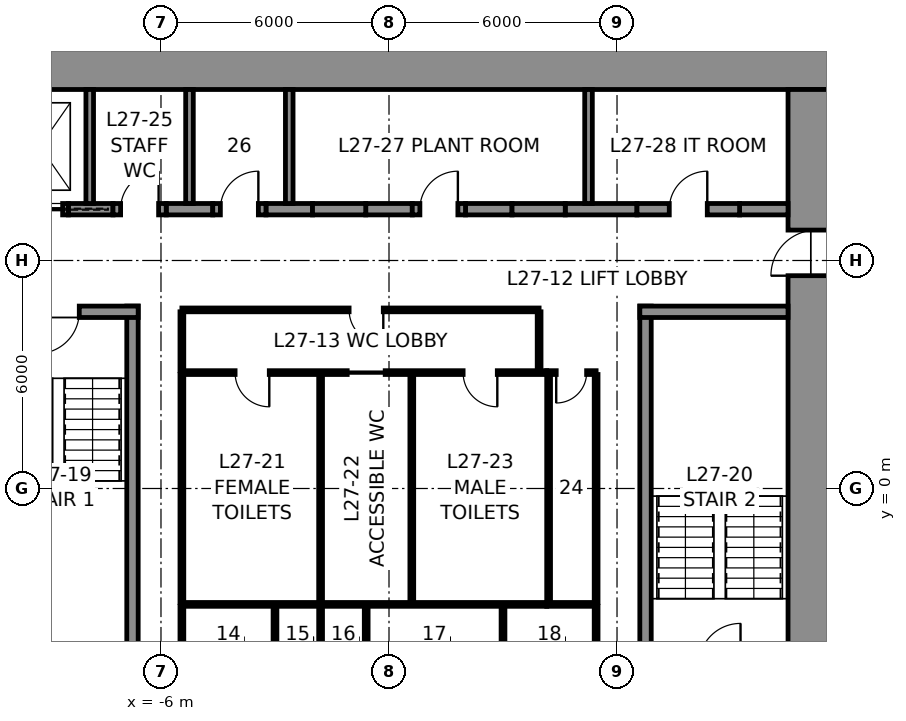
"""IFC4 building model, lengths in metres.
Left out: names, types, materials, properties, quantities, classifications, styles, units other than length and angle.
Written with IfcOpenShell. Run it as: python <this file> out.ifc"""

import sys

from ifc_helpers import new_model, si_unit, direction, frame, frame_2d, origin, place, context, subcontext, project, spatial, rectangle, extrude, element, fill, save


model = new_model("IFC4")
c1 = context("Model", 3, precision=1e-05, world=origin(), true_north=direction((0.0, 1.0)))
c2 = subcontext(c1, "Body", "Model", "MODEL_VIEW")
j1 = project(units=[si_unit("LENGTHUNIT", "METRE"), si_unit("PLANEANGLEUNIT", "RADIAN")], contexts=[c1])
p1 = place(None, origin())
s1 = spatial("IfcSite", under=j1, at=p1, CompositionType="ELEMENT")
p2 = place(p1, origin())
s2 = spatial("IfcBuilding", under=s1, at=p2, CompositionType="ELEMENT")
p3 = place(p2, frame((0.0, 0.0, 135.8)))
s3 = spatial("IfcBuildingStorey", under=s2, at=p3, CompositionType="ELEMENT", Elevation=135.8)
p4 = place(p3, frame((-12.0, 11.25, 0.0), z_axis=(0.0, 0.0, 1.0), x_axis=(1.0, 0.0, 0.0)))
e1 = element("IfcWall", 1, at=p4, inside=s3, PredefinedType="SHEAR", context=c2, shape_type="SweptSolid", body=[
    extrude(rectangle(XDim=24.0, YDim=1.5, at=frame_2d((12.0, 0.0))), origin(), (0.0, 0.0, 1.0), 4.0),
])
p5 = place(p3, frame((11.25, 10.5, 0.0), z_axis=(0.0, 0.0, 1.0), x_axis=(0.0, -1.0, 0.0)))
e2 = element("IfcWall", 2, at=p5, inside=s3, PredefinedType="SHEAR", context=c2, shape_type="SweptSolid", body=[
    extrude(rectangle(XDim=21.0, YDim=1.5, at=frame_2d((10.5, 0.0))), origin(), (0.0, 0.0, 1.0), 4.0),
])
p6 = place(p5, frame((3.7, 0.0, 0.0)))
e3 = element("IfcOpeningElement", 3, at=p6, cuts=e2, PredefinedType="OPENING", context=c2, shape_type="SweptSolid", body=[
    extrude(rectangle(XDim=1.2, YDim=2.3, at=frame_2d((0.6, 1.15))), frame((0.0, 0.76, 0.0), z_axis=(0.0, -1.0, 0.0), x_axis=(1.0, 0.0, 0.0)), (0.0, 0.0, 1.0), 1.52),
])
p7 = place(p5, frame((16.1, 0.0, 0.0)))
e4 = element("IfcOpeningElement", 4, at=p7, cuts=e2, PredefinedType="OPENING", context=c2, shape_type="SweptSolid", body=[
    extrude(rectangle(XDim=1.2, YDim=2.3, at=frame_2d((0.6, 1.15))), frame((0.0, 0.76, 0.0), z_axis=(0.0, -1.0, 0.0), x_axis=(1.0, 0.0, 0.0)), (0.0, 0.0, 1.0), 1.52),
])
p8 = place(p3, frame((-8.438, 7.35, 0.0), z_axis=(0.0, 0.0, 1.0), x_axis=(1.0, 0.0, 0.0)))
e5 = element("IfcWall", 5, at=p8, inside=s3, PredefinedType="SHEAR", context=c2, shape_type="SweptSolid", body=[
    extrude(rectangle(XDim=1.175, YDim=0.3, at=frame_2d((0.587, 0.0))), origin(), (0.0, 0.0, 1.0), 4.0),
])
for number, where, z_axis, x_axis in (
    (6, (-5.863, 7.35, 0.0), (0.0, 0.0, 1.0), (1.0, 0.0, 0.0)),
    (7, (-3.238, 7.35, 0.0), (0.0, 0.0, 1.0), (1.0, 0.0, 0.0)),
    (8, (-0.613, 7.35, 0.0), (0.0, 0.0, 1.0), (1.0, 0.0, 0.0)),
    (9, (2.012, 7.35, 0.0), (0.0, 0.0, 1.0), (1.0, 0.0, 0.0)),
):
    element("IfcWall", number, at=place(p3, frame(where, z_axis=z_axis, x_axis=x_axis)), inside=s3, PredefinedType="SHEAR", context=c2, shape_type="SweptSolid", body=[
        extrude(rectangle(XDim=1.225, YDim=0.3, at=frame_2d((0.613, 0.0))), origin(), (0.0, 0.0, 1.0), 4.0),
    ])
p9 = place(p3, frame((4.637, 7.35, 0.0), z_axis=(0.0, 0.0, 1.0), x_axis=(1.0, 0.0, 0.0)))
e10 = element("IfcWall", 10, at=p9, inside=s3, PredefinedType="SHEAR", context=c2, shape_type="SweptSolid", body=[
    extrude(rectangle(XDim=1.887, YDim=0.3, at=frame_2d((0.944, 0.0))), origin(), (0.0, 0.0, 1.0), 4.0),
])
p10 = place(p3, frame((9.225, 7.35, 0.0), z_axis=(0.0, 0.0, 1.0), x_axis=(1.0, 0.0, 0.0)))
e11 = element("IfcWall", 11, at=p10, inside=s3, PredefinedType="SHEAR", context=c2, shape_type="SweptSolid", body=[
    extrude(rectangle(XDim=1.275, YDim=0.3, at=frame_2d((0.637, 0.0))), origin(), (0.0, 0.0, 1.0), 4.0),
])
p11 = place(p3, frame((-9.938, 7.35, 0.0), z_axis=(0.0, 0.0, 1.0), x_axis=(1.0, 0.0, 0.0)))
e12 = element("IfcWall", 12, at=p11, inside=s3, PredefinedType="PARTITIONING", context=c2, shape_type="SweptSolid", body=[
    extrude(rectangle(XDim=1.5, YDim=0.3, at=frame_2d((0.75, 0.0))), origin(), (0.0, 0.0, 1.0), 4.0),
])
p12 = place(p11, frame((0.15, 0.0, 0.0)))
e13 = element("IfcOpeningElement", 13, at=p12, cuts=e12, PredefinedType="OPENING", context=c2, shape_type="SweptSolid", body=[
    extrude(rectangle(XDim=1.2, YDim=2.3, at=frame_2d((0.6, 1.15))), frame((0.0, 0.16, 0.0), z_axis=(0.0, -1.0, 0.0), x_axis=(1.0, 0.0, 0.0)), (0.0, 0.0, 1.0), 0.32),
])
p13 = place(p3, frame((-7.262, 7.35, 0.0), z_axis=(0.0, 0.0, 1.0), x_axis=(1.0, 0.0, 0.0)))
e14 = element("IfcWall", 14, at=p13, inside=s3, PredefinedType="PARTITIONING", context=c2, shape_type="SweptSolid", body=[
    extrude(rectangle(XDim=1.4, YDim=0.3, at=frame_2d((0.7, 0.0))), origin(), (0.0, 0.0, 1.0), 4.0),
])
p14 = place(p13, frame((0.2, 0.0, 0.0)))
e15 = element("IfcOpeningElement", 15, at=p14, cuts=e14, PredefinedType="OPENING", context=c2, shape_type="SweptSolid", body=[
    extrude(rectangle(XDim=1.0, YDim=2.3, at=frame_2d((0.5, 1.15))), frame((0.0, 0.16, 0.0), z_axis=(0.0, -1.0, 0.0), x_axis=(1.0, 0.0, 0.0)), (0.0, 0.0, 1.0), 0.32),
])
p15 = place(p3, frame((-4.637, 7.35, 0.0), z_axis=(0.0, 0.0, 1.0), x_axis=(1.0, 0.0, 0.0)))
e16 = element("IfcWall", 16, at=p15, inside=s3, PredefinedType="PARTITIONING", context=c2, shape_type="SweptSolid", body=[
    extrude(rectangle(XDim=1.4, YDim=0.3, at=frame_2d((0.7, 0.0))), origin(), (0.0, 0.0, 1.0), 4.0),
])
p16 = place(p15, frame((0.2, 0.0, 0.0)))
e17 = element("IfcOpeningElement", 17, at=p16, cuts=e16, PredefinedType="OPENING", context=c2, shape_type="SweptSolid", body=[
    extrude(rectangle(XDim=1.0, YDim=2.3, at=frame_2d((0.5, 1.15))), frame((0.0, 0.16, 0.0), z_axis=(0.0, -1.0, 0.0), x_axis=(1.0, 0.0, 0.0)), (0.0, 0.0, 1.0), 0.32),
])
p17 = place(p3, frame((-2.012, 7.35, 0.0), z_axis=(0.0, 0.0, 1.0), x_axis=(1.0, 0.0, 0.0)))
e18 = element("IfcWall", 18, at=p17, inside=s3, PredefinedType="PARTITIONING", context=c2, shape_type="SweptSolid", body=[
    extrude(rectangle(XDim=1.4, YDim=0.3, at=frame_2d((0.7, 0.0))), origin(), (0.0, 0.0, 1.0), 4.0),
])
p18 = place(p3, frame((0.613, 7.35, 0.0), z_axis=(0.0, 0.0, 1.0), x_axis=(1.0, 0.0, 0.0)))
e19 = element("IfcWall", 19, at=p18, inside=s3, PredefinedType="PARTITIONING", context=c2, shape_type="SweptSolid", body=[
    extrude(rectangle(XDim=1.4, YDim=0.3, at=frame_2d((0.7, 0.0))), origin(), (0.0, 0.0, 1.0), 4.0),
])
p19 = place(p18, frame((0.2, 0.0, 0.0)))
e20 = element("IfcOpeningElement", 20, at=p19, cuts=e19, PredefinedType="OPENING", context=c2, shape_type="SweptSolid", body=[
    extrude(rectangle(XDim=1.0, YDim=2.3, at=frame_2d((0.5, 1.15))), frame((0.0, 0.16, 0.0), z_axis=(0.0, -1.0, 0.0), x_axis=(1.0, 0.0, 0.0)), (0.0, 0.0, 1.0), 0.32),
])
p20 = place(p3, frame((3.238, 7.35, 0.0), z_axis=(0.0, 0.0, 1.0), x_axis=(1.0, 0.0, 0.0)))
e21 = element("IfcWall", 21, at=p20, inside=s3, PredefinedType="PARTITIONING", context=c2, shape_type="SweptSolid", body=[
    extrude(rectangle(XDim=1.4, YDim=0.3, at=frame_2d((0.7, 0.0))), origin(), (0.0, 0.0, 1.0), 4.0),
])
p21 = place(p3, frame((6.525, 7.35, 0.0), z_axis=(0.0, 0.0, 1.0), x_axis=(1.0, 0.0, 0.0)))
e22 = element("IfcWall", 22, at=p21, inside=s3, PredefinedType="PARTITIONING", context=c2, shape_type="SweptSolid", body=[
    extrude(rectangle(XDim=2.7, YDim=0.3, at=frame_2d((1.35, 0.0))), origin(), (0.0, 0.0, 1.0), 4.0),
])
p22 = place(p21, frame((0.85, 0.0, 0.0)))
e23 = element("IfcOpeningElement", 23, at=p22, cuts=e22, PredefinedType="OPENING", context=c2, shape_type="SweptSolid", body=[
    extrude(rectangle(XDim=1.0, YDim=2.3, at=frame_2d((0.5, 1.15))), frame((0.0, 0.16, 0.0), z_axis=(0.0, -1.0, 0.0), x_axis=(1.0, 0.0, 0.0)), (0.0, 0.0, 1.0), 0.32),
])
for number, where, z_axis, x_axis in (
    (24, (-7.875, 7.5, 0.0), (0.0, 0.0, 1.0), (0.0, 1.0, 0.0)),
    (25, (-5.25, 7.5, 0.0), (0.0, 0.0, 1.0), (0.0, 1.0, 0.0)),
    (26, (-2.625, 7.5, 0.0), (0.0, 0.0, 1.0), (0.0, 1.0, 0.0)),
    (27, (5.25, 7.5, 0.0), (0.0, 0.0, 1.0), (0.0, 1.0, 0.0)),
):
    element("IfcWall", number, at=place(p3, frame(where, z_axis=z_axis, x_axis=x_axis)), inside=s3, PredefinedType="PARTITIONING", context=c2, shape_type="SweptSolid", body=[
        extrude(rectangle(XDim=3.0, YDim=0.2, at=frame_2d((1.5, 0.0))), origin(), (0.0, 0.0, 1.0), 4.0),
    ])
p23 = place(p3, frame((-6.75, -4.8, 0.0), z_axis=(0.0, 0.0, 1.0), x_axis=(0.0, 1.0, 0.0)))
e28 = element("IfcWall", 28, at=p23, inside=s3, PredefinedType="SOLIDWALL", context=c2, shape_type="SweptSolid", body=[
    extrude(rectangle(XDim=9.6, YDim=0.3, at=frame_2d((4.8, 0.0))), origin(), (0.0, 0.0, 1.0), 3.75),
])
p24 = place(p3, frame((-10.5, 4.65, 0.0), z_axis=(0.0, 0.0, 1.0), x_axis=(1.0, 0.0, 0.0)))
e29 = element("IfcWall", 29, at=p24, inside=s3, PredefinedType="SOLIDWALL", context=c2, shape_type="SweptSolid", body=[
    extrude(rectangle(XDim=3.9, YDim=0.3, at=frame_2d((1.95, 0.0))), origin(), (0.0, 0.0, 1.0), 3.75),
])
p25 = place(p24, frame((1.25, 0.0, 0.0)))
e30 = element("IfcOpeningElement", 30, at=p25, cuts=e29, PredefinedType="OPENING", context=c2, shape_type="SweptSolid", body=[
    extrude(rectangle(XDim=1.1, YDim=2.3, at=frame_2d((0.55, 1.15))), frame((0.0, 0.16, 0.0), z_axis=(0.0, -1.0, 0.0), x_axis=(1.0, 0.0, 0.0)), (0.0, 0.0, 1.0), 0.32),
])
p26 = place(p3, frame((6.75, -4.8, 0.0), z_axis=(0.0, 0.0, 1.0), x_axis=(0.0, 1.0, 0.0)))
e31 = element("IfcWall", 31, at=p26, inside=s3, PredefinedType="SOLIDWALL", context=c2, shape_type="SweptSolid", body=[
    extrude(rectangle(XDim=9.6, YDim=0.3, at=frame_2d((4.8, 0.0))), origin(), (0.0, 0.0, 1.0), 3.75),
])
p27 = place(p3, frame((6.6, 4.65, 0.0), z_axis=(0.0, 0.0, 1.0), x_axis=(1.0, 0.0, 0.0)))
e32 = element("IfcWall", 32, at=p27, inside=s3, PredefinedType="SOLIDWALL", context=c2, shape_type="SweptSolid", body=[
    extrude(rectangle(XDim=3.9, YDim=0.3, at=frame_2d((1.95, 0.0))), origin(), (0.0, 0.0, 1.0), 3.75),
])
p28 = place(p3, frame((-5.45, 3.05, 0.0), z_axis=(0.0, 0.0, 1.0), x_axis=(1.0, 0.0, 0.0)))
e33 = element("IfcWall", 33, at=p28, inside=s3, PredefinedType="PARTITIONING", context=c2, shape_type="SweptSolid", body=[
    extrude(rectangle(XDim=9.6, YDim=0.1, at=frame_2d((4.8, 0.0))), origin(), (0.0, 0.0, 1.0), 3.75),
])
p29 = place(p28, frame((1.4, 0.0, 0.0)))
e34 = element("IfcOpeningElement", 34, at=p29, cuts=e33, PredefinedType="OPENING", context=c2, shape_type="SweptSolid", body=[
    extrude(rectangle(XDim=0.9, YDim=2.3, at=frame_2d((0.45, 1.15))), frame((0.0, 0.06, 0.0), z_axis=(0.0, -1.0, 0.0), x_axis=(1.0, 0.0, 0.0)), (0.0, 0.0, 1.0), 0.12),
])
p30 = place(p28, frame((4.35, 0.0, 0.0)))
e35 = element("IfcOpeningElement", 35, at=p30, cuts=e33, PredefinedType="OPENING", context=c2, shape_type="SweptSolid", body=[
    extrude(rectangle(XDim=1.0, YDim=2.3, at=frame_2d((0.5, 1.15))), frame((0.0, 0.06, 0.0), z_axis=(0.0, -1.0, 0.0), x_axis=(1.0, 0.0, 0.0)), (0.0, 0.0, 1.0), 0.12),
])
p31 = place(p28, frame((7.4, 0.0, 0.0)))
e36 = element("IfcOpeningElement", 36, at=p31, cuts=e33, PredefinedType="OPENING", context=c2, shape_type="SweptSolid", body=[
    extrude(rectangle(XDim=0.9, YDim=2.3, at=frame_2d((0.45, 1.15))), frame((0.0, 0.06, 0.0), z_axis=(0.0, -1.0, 0.0), x_axis=(1.0, 0.0, 0.0)), (0.0, 0.0, 1.0), 0.12),
])
p32 = place(p3, frame((4.15, 3.05, 0.0), z_axis=(0.0, 0.0, 1.0), x_axis=(1.0, 0.0, 0.0)))
e37 = element("IfcWall", 37, at=p32, inside=s3, PredefinedType="PARTITIONING", context=c2, shape_type="SweptSolid", body=[
    extrude(rectangle(XDim=1.3, YDim=0.1, at=frame_2d((0.65, 0.0))), origin(), (0.0, 0.0, 1.0), 3.75),
])
p33 = place(p32, frame((0.25, 0.0, 0.0)))
e38 = element("IfcOpeningElement", 38, at=p33, cuts=e37, PredefinedType="OPENING", context=c2, shape_type="SweptSolid", body=[
    extrude(rectangle(XDim=0.8, YDim=2.3, at=frame_2d((0.4, 1.15))), frame((0.0, 0.06, 0.0), z_axis=(0.0, -1.0, 0.0), x_axis=(1.0, 0.0, 0.0)), (0.0, 0.0, 1.0), 0.12),
])
p34 = place(p3, frame((4.15, -3.05, 0.0), z_axis=(0.0, 0.0, 1.0), x_axis=(-1.0, 0.0, 0.0)))
e39 = element("IfcWall", 39, at=p34, inside=s3, PredefinedType="PARTITIONING", context=c2, shape_type="SweptSolid", body=[
    extrude(rectangle(XDim=9.6, YDim=0.1, at=frame_2d((4.8, 0.0))), origin(), (0.0, 0.0, 1.0), 3.75),
])
p35 = place(p3, frame((5.45, -3.05, 0.0), z_axis=(0.0, 0.0, 1.0), x_axis=(-1.0, 0.0, 0.0)))
e40 = element("IfcWall", 40, at=p35, inside=s3, PredefinedType="PARTITIONING", context=c2, shape_type="SweptSolid", body=[
    extrude(rectangle(XDim=1.3, YDim=0.1, at=frame_2d((0.65, 0.0))), origin(), (0.0, 0.0, 1.0), 3.75),
])
for number, where, z_axis, x_axis in (
    (41, (5.45, 3.0, 0.0), (0.0, 0.0, 1.0), (0.0, -1.0, 0.0)),
    (42, (-5.45, -3.0, 0.0), (0.0, 0.0, 1.0), (0.0, 1.0, 0.0)),
    (43, (-1.8, -3.0, 0.0), (0.0, 0.0, 1.0), (0.0, 1.0, 0.0)),
    (44, (0.6, -3.0, 0.0), (0.0, 0.0, 1.0), (0.0, 1.0, 0.0)),
    (45, (4.2, -3.0, 0.0), (0.0, 0.0, 1.0), (0.0, 1.0, 0.0)),
):
    element("IfcWall", number, at=place(p3, frame(where, z_axis=z_axis, x_axis=x_axis)), inside=s3, PredefinedType="PARTITIONING", context=c2, shape_type="SweptSolid", body=[
        extrude(rectangle(XDim=6.0, YDim=0.1, at=frame_2d((3.0, 0.0))), origin(), (0.0, 0.0, 1.0), 3.75),
    ])
p36 = place(p3, frame((-5.45, 4.7, 0.0), z_axis=(0.0, 0.0, 1.0), x_axis=(1.0, 0.0, 0.0)))
e46 = element("IfcWall", 46, at=p36, inside=s3, PredefinedType="PARTITIONING", context=c2, shape_type="SweptSolid", body=[
    extrude(rectangle(XDim=9.4, YDim=0.1, at=frame_2d((4.7, 0.0))), origin(), (0.0, 0.0, 1.0), 3.75),
])
p37 = place(p36, frame((4.4, 0.0, 0.0)))
e47 = element("IfcOpeningElement", 47, at=p37, cuts=e46, PredefinedType="OPENING", context=c2, shape_type="SweptSolid", body=[
    extrude(rectangle(XDim=0.9, YDim=2.3, at=frame_2d((0.45, 1.15))), frame((0.0, 0.06, 0.0), z_axis=(0.0, -1.0, 0.0), x_axis=(1.0, 0.0, 0.0)), (0.0, 0.0, 1.0), 0.12),
])
for number, where, z_axis, x_axis in (
    (48, (-5.45, 3.1, 0.0), (0.0, 0.0, 1.0), (0.0, 1.0, 0.0)),
    (49, (3.95, 3.1, 0.0), (0.0, 0.0, 1.0), (0.0, 1.0, 0.0)),
    (50, (-5.45, -3.1, 0.0), (0.0, 0.0, 1.0), (0.0, -1.0, 0.0)),
    (51, (5.45, -3.1, 0.0), (0.0, 0.0, 1.0), (0.0, -1.0, 0.0)),
    (52, (-3.0, -3.1, 0.0), (0.0, 0.0, 1.0), (0.0, -1.0, 0.0)),
    (53, (-1.8, -3.1, 0.0), (0.0, 0.0, 1.0), (0.0, -1.0, 0.0)),
    (54, (-0.6, -3.1, 0.0), (0.0, 0.0, 1.0), (0.0, -1.0, 0.0)),
    (55, (3.0, -3.1, 0.0), (0.0, 0.0, 1.0), (0.0, -1.0, 0.0)),
):
    element("IfcWall", number, at=place(p3, frame(where, z_axis=z_axis, x_axis=x_axis)), inside=s3, PredefinedType="PARTITIONING", context=c2, shape_type="SweptSolid", body=[
        extrude(rectangle(XDim=1.55, YDim=0.1, at=frame_2d((0.775, 0.0))), origin(), (0.0, 0.0, 1.0), 3.75),
    ])
p38 = place(p25, frame((1.1, 0.0, 0.0), z_axis=(0.0, 0.0, 1.0), x_axis=(-1.0, 0.0, 0.0)))
e56 = element("IfcDoor", 56, at=p38, inside=s3, OperationType="SINGLE_SWING_RIGHT", PredefinedType="DOOR", context=c2, shape_type="SweptSolid", body=[
    extrude(rectangle(XDim=1.1, YDim=2.3, at=frame_2d((0.55, 1.15))), frame((0.0, 0.025, 0.0), z_axis=(0.0, -1.0, 0.0), x_axis=(1.0, 0.0, 0.0)), (0.0, 0.0, 1.0), 0.05),
])
fill(e30, e56)
p39 = place(p29, frame((0.9, 0.0, 0.0), z_axis=(0.0, 0.0, 1.0), x_axis=(-1.0, 0.0, 0.0)))
e57 = element("IfcDoor", 57, at=p39, inside=s3, OperationType="SINGLE_SWING_LEFT", PredefinedType="DOOR", context=c2, shape_type="SweptSolid", body=[
    extrude(rectangle(XDim=0.9, YDim=2.3, at=frame_2d((0.45, 1.15))), frame((0.0, 0.025, 0.0), z_axis=(0.0, -1.0, 0.0), x_axis=(1.0, 0.0, 0.0)), (0.0, 0.0, 1.0), 0.05),
])
fill(e34, e57)
p40 = place(p30, frame((1.0, 0.0, 0.0), z_axis=(0.0, 0.0, 1.0), x_axis=(-1.0, 0.0, 0.0)))
e58 = element("IfcDoor", 58, at=p40, inside=s3, OperationType="SLIDING_TO_LEFT", PredefinedType="DOOR", context=c2, shape_type="SweptSolid", body=[
    extrude(rectangle(XDim=1.0, YDim=2.3, at=frame_2d((0.5, 1.15))), frame((0.0, 0.025, 0.0), z_axis=(0.0, -1.0, 0.0), x_axis=(1.0, 0.0, 0.0)), (0.0, 0.0, 1.0), 0.05),
])
fill(e35, e58)
p41 = place(p31, frame((0.9, 0.0, 0.0), z_axis=(0.0, 0.0, 1.0), x_axis=(-1.0, 0.0, 0.0)))
e59 = element("IfcDoor", 59, at=p41, inside=s3, OperationType="SINGLE_SWING_LEFT", PredefinedType="DOOR", context=c2, shape_type="SweptSolid", body=[
    extrude(rectangle(XDim=0.9, YDim=2.3, at=frame_2d((0.45, 1.15))), frame((0.0, 0.025, 0.0), z_axis=(0.0, -1.0, 0.0), x_axis=(1.0, 0.0, 0.0)), (0.0, 0.0, 1.0), 0.05),
])
fill(e36, e59)
p42 = place(p33, frame((0.8, 0.0, 0.0), z_axis=(0.0, 0.0, 1.0), x_axis=(-1.0, 0.0, 0.0)))
e60 = element("IfcDoor", 60, at=p42, inside=s3, OperationType="SINGLE_SWING_RIGHT", PredefinedType="DOOR", context=c2, shape_type="SweptSolid", body=[
    extrude(rectangle(XDim=0.8, YDim=2.3, at=frame_2d((0.4, 1.15))), frame((0.0, 0.025, 0.0), z_axis=(0.0, -1.0, 0.0), x_axis=(1.0, 0.0, 0.0)), (0.0, 0.0, 1.0), 0.05),
])
fill(e38, e60)
p43 = place(p37, frame((0.9, 0.0, 0.0), z_axis=(0.0, 0.0, 1.0), x_axis=(-1.0, 0.0, 0.0)))
e61 = element("IfcDoor", 61, at=p43, inside=s3, OperationType="SINGLE_SWING_LEFT", PredefinedType="DOOR", context=c2, shape_type="SweptSolid", body=[
    extrude(rectangle(XDim=0.9, YDim=2.3, at=frame_2d((0.45, 1.15))), frame((0.0, 0.025, 0.0), z_axis=(0.0, -1.0, 0.0), x_axis=(1.0, 0.0, 0.0)), (0.0, 0.0, 1.0), 0.05),
])
fill(e47, e61)
p44 = place(p14, origin())
e62 = element("IfcDoor", 62, at=p44, inside=s3, OperationType="SINGLE_SWING_RIGHT", PredefinedType="DOOR", context=c2, shape_type="SweptSolid", body=[
    extrude(rectangle(XDim=1.0, YDim=2.3, at=frame_2d((0.5, 1.15))), frame((0.0, 0.025, 0.0), z_axis=(0.0, -1.0, 0.0), x_axis=(1.0, 0.0, 0.0)), (0.0, 0.0, 1.0), 0.05),
])
fill(e15, e62)
p45 = place(p16, origin())
e63 = element("IfcDoor", 63, at=p45, inside=s3, OperationType="SINGLE_SWING_RIGHT", PredefinedType="DOOR", context=c2, shape_type="SweptSolid", body=[
    extrude(rectangle(XDim=1.0, YDim=2.3, at=frame_2d((0.5, 1.15))), frame((0.0, 0.025, 0.0), z_axis=(0.0, -1.0, 0.0), x_axis=(1.0, 0.0, 0.0)), (0.0, 0.0, 1.0), 0.05),
])
fill(e17, e63)
p46 = place(p19, origin())
e64 = element("IfcDoor", 64, at=p46, inside=s3, OperationType="SINGLE_SWING_RIGHT", PredefinedType="DOOR", context=c2, shape_type="SweptSolid", body=[
    extrude(rectangle(XDim=1.0, YDim=2.3, at=frame_2d((0.5, 1.15))), frame((0.0, 0.025, 0.0), z_axis=(0.0, -1.0, 0.0), x_axis=(1.0, 0.0, 0.0)), (0.0, 0.0, 1.0), 0.05),
])
fill(e20, e64)
p47 = place(p22, origin())
e65 = element("IfcDoor", 65, at=p47, inside=s3, OperationType="SINGLE_SWING_RIGHT", PredefinedType="DOOR", context=c2, shape_type="SweptSolid", body=[
    extrude(rectangle(XDim=1.0, YDim=2.3, at=frame_2d((0.5, 1.15))), frame((0.0, 0.025, 0.0), z_axis=(0.0, -1.0, 0.0), x_axis=(1.0, 0.0, 0.0)), (0.0, 0.0, 1.0), 0.05),
])
fill(e23, e65)
p48 = place(p6, frame((1.2, 0.0, 0.0), z_axis=(0.0, 0.0, 1.0), x_axis=(-1.0, 0.0, 0.0)))
e66 = element("IfcDoor", 66, at=p48, inside=s3, OperationType="SINGLE_SWING_LEFT", PredefinedType="DOOR", context=c2, shape_type="SweptSolid", body=[
    extrude(rectangle(XDim=1.2, YDim=2.3, at=frame_2d((0.6, 1.15))), frame((0.0, 0.025, 0.0), z_axis=(0.0, -1.0, 0.0), x_axis=(1.0, 0.0, 0.0)), (0.0, 0.0, 1.0), 0.05),
])
fill(e3, e66)
p49 = place(p12, frame((1.2, 0.0, 0.0), z_axis=(0.0, 0.0, 1.0), x_axis=(-1.0, 0.0, 0.0)))
e67 = element("IfcDoor", 67, at=p49, inside=s3, OperationType="SLIDING_TO_LEFT", PredefinedType="DOOR", context=c2, shape_type="SweptSolid", body=[
    extrude(rectangle(XDim=1.2, YDim=2.3, at=frame_2d((0.6, 1.15))), frame((0.0, 0.025, 0.0), z_axis=(0.0, -1.0, 0.0), x_axis=(1.0, 0.0, 0.0)), (0.0, 0.0, 1.0), 0.05),
])
fill(e13, e67)
save(model, sys.argv[1])
